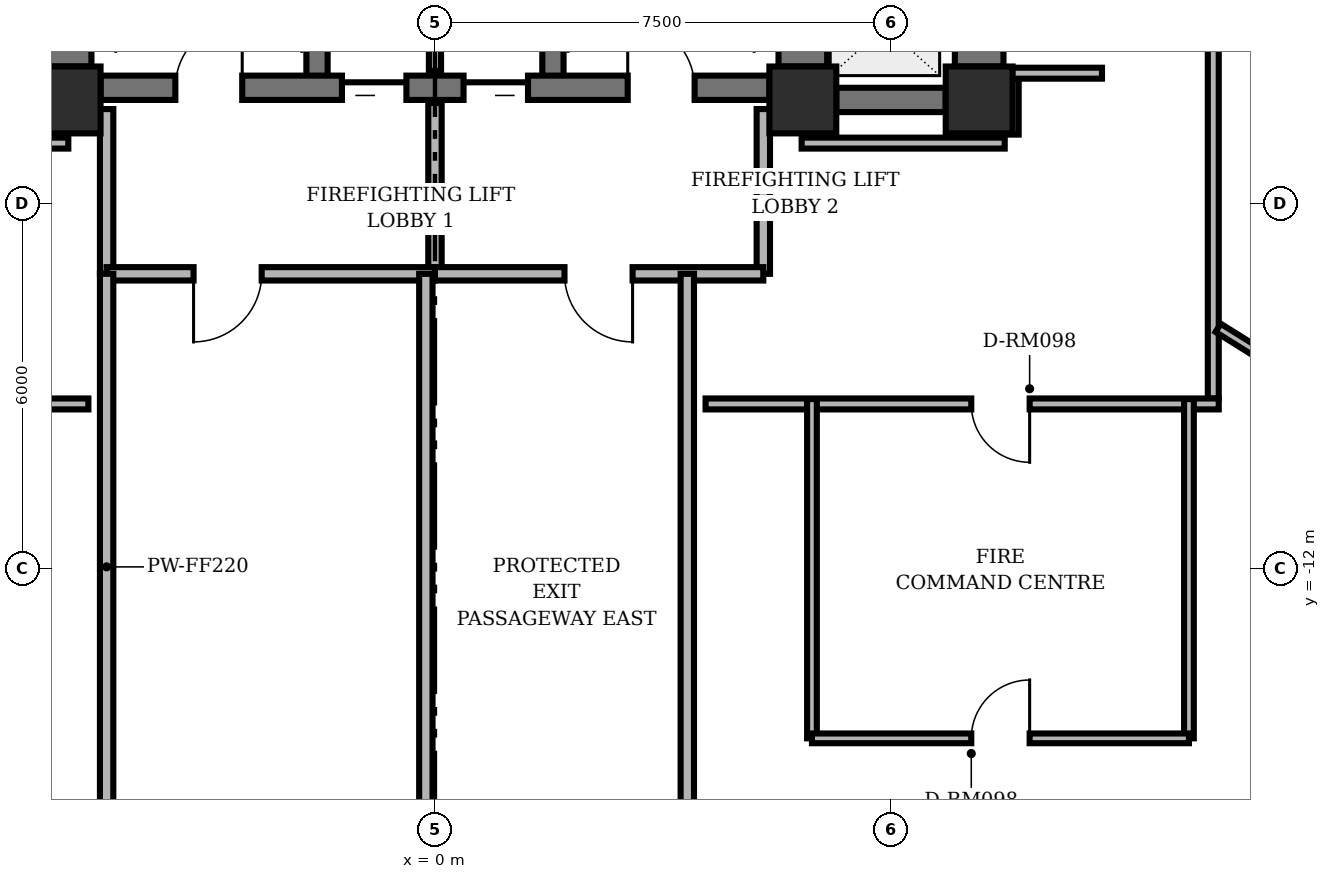
"""IFC4 building model, lengths in metres.
Left out: names, types, materials, properties, quantities, classifications, styles, units other than length and angle.
Written with IfcOpenShell. Run it as: python <this file> out.ifc"""

import sys

from ifc_helpers import new_model, si_unit, direction, frame, frame_2d, origin, origin_2d, place, context, subcontext, project, spatial, rectangle, hollow_rectangle, extrude, element, fill, save


model = new_model("IFC4")
c1 = context("Model", 3, precision=1e-05, world=origin(), true_north=direction((0.0, 1.0)))
c2 = subcontext(c1, "Body", "Model", "MODEL_VIEW")
j1 = project(units=[si_unit("LENGTHUNIT", "METRE"), si_unit("PLANEANGLEUNIT", "RADIAN")], contexts=[c1])
p1 = place(None, origin())
s1 = spatial("IfcSite", under=j1, at=p1, CompositionType="ELEMENT")
p2 = place(p1, origin())
s2 = spatial("IfcBuilding", under=s1, at=p2, CompositionType="ELEMENT")
p3 = place(p2, origin())
s3 = spatial("IfcBuildingStorey", under=s2, at=p3, CompositionType="ELEMENT", Elevation=0.0)
for number, where, z_axis, x_axis in (
    (1, (-6.05, -4.3, 0.0), (0.0, 0.0, 1.0), (1.0, 0.0, 0.0)),
    (2, (6.05, -4.3, 0.0), (0.0, 0.0, 1.0), (1.0, 0.0, 0.0)),
    (3, (8.95, -4.3, 0.0), (0.0, 0.0, 1.0), (1.0, 0.0, 0.0)),
):
    element("IfcColumn", number, at=place(p3, frame(where, z_axis=z_axis, x_axis=x_axis)), inside=s3, PredefinedType="COLUMN", context=c2, shape_type="SweptSolid", body=[
        extrude(hollow_rectangle(XDim=1.1, YDim=1.1, WallThickness=0.07, InnerFilletRadius=0.02, OuterFilletRadius=0.04, at=origin_2d()), origin(), (0.0, 0.0, 1.0), 4.8),
    ])
for number, where, z_axis, x_axis in (
    (4, (-6.05, -3.75, 0.0), (0.0, 0.0, 1.0), (0.0, 1.0, 0.0)),
    (5, (6.05, -3.75, 0.0), (0.0, 0.0, 1.0), (0.0, 1.0, 0.0)),
):
    element("IfcWall", number, at=place(p3, frame(where, z_axis=z_axis, x_axis=x_axis)), inside=s3, PredefinedType="SHEAR", context=c2, shape_type="SweptSolid", body=[
        extrude(rectangle(XDim=3.2, YDim=0.8, at=frame_2d((1.6, 0.0))), origin(), (0.0, 0.0, 1.0), 4.498),
    ])
for number, where, z_axis, x_axis in (
    (6, (-1.94, -4.1, 0.0), (0.0, 0.0, 1.0), (0.0, 1.0, 0.0)),
    (7, (1.94, -4.1, 0.0), (0.0, 0.0, 1.0), (0.0, 1.0, 0.0)),
):
    element("IfcWall", number, at=place(p3, frame(where, z_axis=z_axis, x_axis=x_axis)), inside=s3, PredefinedType="SHEAR", context=c2, shape_type="SweptSolid", body=[
        extrude(rectangle(XDim=8.2, YDim=0.35, at=frame_2d((4.1, 0.0))), origin(), (0.0, 0.0, 1.0), 4.498),
    ])
p4 = place(p3, frame((-5.5, -4.1, 0.0), z_axis=(0.0, 0.0, 1.0), x_axis=(1.0, 0.0, 0.0)))
e8 = element("IfcWall", 8, at=p4, inside=s3, PredefinedType="SHEAR", context=c2, shape_type="SweptSolid", body=[
    extrude(rectangle(XDim=11.0, YDim=0.4, at=frame_2d((5.5, 0.0))), origin(), (0.0, 0.0, 1.0), 4.498),
])
p5 = place(p4, frame((1.23, 0.0, 0.0)))
e9 = element("IfcOpeningElement", 9, at=p5, cuts=e8, PredefinedType="OPENING", context=c2, shape_type="SweptSolid", body=[
    extrude(rectangle(XDim=1.1, YDim=2.04, at=frame_2d((0.55, 1.02))), frame((0.0, 0.21, 0.0), z_axis=(0.0, -1.0, 0.0), x_axis=(1.0, 0.0, 0.0)), (0.0, 0.0, 1.0), 0.42),
])
p6 = place(p4, frame((8.67, 0.0, 0.0)))
e10 = element("IfcOpeningElement", 10, at=p6, cuts=e8, PredefinedType="OPENING", context=c2, shape_type="SweptSolid", body=[
    extrude(rectangle(XDim=1.1, YDim=2.04, at=frame_2d((0.55, 1.02))), frame((0.0, 0.21, 0.0), z_axis=(0.0, -1.0, 0.0), x_axis=(1.0, 0.0, 0.0)), (0.0, 0.0, 1.0), 0.42),
])
p7 = place(p4, frame((3.97, 0.0, 0.0)))
e11 = element("IfcOpeningElement", 11, at=p7, cuts=e8, PredefinedType="OPENING", context=c2, shape_type="SweptSolid", body=[
    extrude(rectangle(XDim=1.06, YDim=2.04, at=frame_2d((0.53, 1.02))), frame((0.0, 0.21, 0.0), z_axis=(0.0, -1.0, 0.0), x_axis=(1.0, 0.0, 0.0)), (0.0, 0.0, 1.0), 0.42),
])
p8 = place(p4, frame((5.97, 0.0, 0.0)))
e12 = element("IfcOpeningElement", 12, at=p8, cuts=e8, PredefinedType="OPENING", context=c2, shape_type="SweptSolid", body=[
    extrude(rectangle(XDim=1.06, YDim=2.04, at=frame_2d((0.53, 1.02))), frame((0.0, 0.21, 0.0), z_axis=(0.0, -1.0, 0.0), x_axis=(1.0, 0.0, 0.0)), (0.0, 0.0, 1.0), 0.42),
])
p9 = place(p3, frame((8.95, -3.75, 0.0), z_axis=(0.0, 0.0, 1.0), x_axis=(0.0, 1.0, 0.0)))
e13 = element("IfcWall", 13, at=p9, inside=s3, PredefinedType="SHEAR", context=c2, shape_type="SweptSolid", body=[
    extrude(rectangle(XDim=7.7, YDim=0.8, at=frame_2d((3.85, 0.0))), origin(), (0.0, 0.0, 1.0), 4.498),
])
p10 = place(p9, frame((0.55, 0.0, 0.0)))
e14 = element("IfcOpeningElement", 14, at=p10, cuts=e13, PredefinedType="OPENING", context=c2, shape_type="SweptSolid", body=[
    extrude(rectangle(XDim=1.06, YDim=2.04, at=frame_2d((0.53, 1.02))), frame((0.0, 0.41, 0.0), z_axis=(0.0, -1.0, 0.0), x_axis=(1.0, 0.0, 0.0)), (0.0, 0.0, 1.0), 0.82),
])
p11 = place(p9, frame((3.32, 0.0, 0.0)))
e15 = element("IfcOpeningElement", 15, at=p11, cuts=e13, PredefinedType="OPENING", context=c2, shape_type="SweptSolid", body=[
    extrude(rectangle(XDim=1.06, YDim=2.04, at=frame_2d((0.53, 1.02))), frame((0.0, 0.41, 0.0), z_axis=(0.0, -1.0, 0.0), x_axis=(1.0, 0.0, 0.0)), (0.0, 0.0, 1.0), 0.82),
])
p12 = place(p9, frame((6.08, 0.0, 0.0)))
e16 = element("IfcOpeningElement", 16, at=p12, cuts=e13, PredefinedType="OPENING", context=c2, shape_type="SweptSolid", body=[
    extrude(rectangle(XDim=1.06, YDim=2.04, at=frame_2d((0.53, 1.02))), frame((0.0, 0.41, 0.0), z_axis=(0.0, -1.0, 0.0), x_axis=(1.0, 0.0, 0.0)), (0.0, 0.0, 1.0), 0.82),
])
p13 = place(p3, frame((6.6, -4.3, 0.0), z_axis=(0.0, 0.0, 1.0), x_axis=(1.0, 0.0, 0.0)))
e17 = element("IfcWall", 17, at=p13, inside=s3, PredefinedType="SHEAR", context=c2, shape_type="SweptSolid", body=[
    extrude(rectangle(XDim=1.8, YDim=0.4, at=frame_2d((0.9, 0.0))), origin(), (0.0, 0.0, 1.0), 4.498),
])
p14 = place(p3, frame((0.0, -3.82, 0.0), z_axis=(0.0, 0.0, 1.0), x_axis=(0.0, 1.0, 0.0)))
e18 = element("IfcWall", 18, at=p14, inside=s3, PredefinedType="PARTITIONING", context=c2, shape_type="SweptSolid", body=[
    extrude(rectangle(XDim=2.67, YDim=0.2, at=frame_2d((1.335, 0.0))), origin(), (0.0, 0.0, 1.0), 4.473),
])
for number, where, z_axis, x_axis in (
    (19, (-5.4, -7.16, 0.0), (0.0, 0.0, 1.0), (0.0, 1.0, 0.0)),
    (20, (5.4, -7.16, 0.0), (0.0, 0.0, 1.0), (0.0, 1.0, 0.0)),
):
    element("IfcWall", number, at=place(p3, frame(where, z_axis=z_axis, x_axis=x_axis)), inside=s3, PredefinedType="PARTITIONING", context=c2, shape_type="SweptSolid", body=[
        extrude(rectangle(XDim=2.71, YDim=0.22, at=frame_2d((1.355, 0.0))), origin(), (0.0, 0.0, 1.0), 4.473),
    ])
p15 = place(p3, frame((0.0, -7.16, 0.0), z_axis=(0.0, 0.0, 1.0), x_axis=(0.0, 1.0, 0.0)))
e21 = element("IfcWall", 21, at=p15, inside=s3, PredefinedType="PARTITIONING", context=c2, shape_type="SweptSolid", body=[
    extrude(rectangle(XDim=2.81, YDim=0.22, at=frame_2d((1.405, 0.0))), origin(), (0.0, 0.0, 1.0), 4.473),
])
p16 = place(p3, frame((0.0, -7.16, 0.0), z_axis=(0.0, 0.0, 1.0), x_axis=(-1.0, 0.0, 0.0)))
e22 = element("IfcWall", 22, at=p16, inside=s3, PredefinedType="PARTITIONING", context=c2, shape_type="SweptSolid", body=[
    extrude(rectangle(XDim=5.4, YDim=0.22, at=frame_2d((2.7, 0.0))), origin(), (0.0, 0.0, 1.0), 4.473),
])
p17 = place(p16, frame((2.85, 0.0, 0.0)))
e23 = element("IfcOpeningElement", 23, at=p17, cuts=e22, PredefinedType="OPENING", context=c2, shape_type="SweptSolid", body=[
    extrude(rectangle(XDim=1.12, YDim=2.02, at=frame_2d((0.56, 1.01))), frame((0.0, 0.12, 0.0), z_axis=(0.0, -1.0, 0.0), x_axis=(1.0, 0.0, 0.0)), (0.0, 0.0, 1.0), 0.24),
])
p18 = place(p3, frame((5.4, -7.16, 0.0), z_axis=(0.0, 0.0, 1.0), x_axis=(-1.0, 0.0, 0.0)))
e24 = element("IfcWall", 24, at=p18, inside=s3, PredefinedType="PARTITIONING", context=c2, shape_type="SweptSolid", body=[
    extrude(rectangle(XDim=5.4, YDim=0.22, at=frame_2d((2.7, 0.0))), origin(), (0.0, 0.0, 1.0), 4.473),
])
p19 = place(p18, frame((2.15, 0.0, 0.0)))
e25 = element("IfcOpeningElement", 25, at=p19, cuts=e24, PredefinedType="OPENING", context=c2, shape_type="SweptSolid", body=[
    extrude(rectangle(XDim=1.12, YDim=2.02, at=frame_2d((0.56, 1.01))), frame((0.0, 0.12, 0.0), z_axis=(0.0, -1.0, 0.0), x_axis=(1.0, 0.0, 0.0)), (0.0, 0.0, 1.0), 0.24),
])
p20 = place(p3, frame((-5.4, -16.8, 0.0), z_axis=(0.0, 0.0, 1.0), x_axis=(0.0, 1.0, 0.0)))
e26 = element("IfcWall", 26, at=p20, inside=s3, PredefinedType="PARTITIONING", context=c2, shape_type="SweptSolid", body=[
    extrude(rectangle(XDim=9.64, YDim=0.22, at=frame_2d((4.82, 0.0))), origin(), (0.0, 0.0, 1.0), 4.473),
])
for number, where, z_axis, x_axis in (
    (27, (-0.15, -24.5, 0.0), (0.0, 0.0, 1.0), (0.0, 1.0, 0.0)),
    (28, (4.15, -24.5, 0.0), (0.0, 0.0, 1.0), (0.0, 1.0, 0.0)),
):
    element("IfcWall", number, at=place(p3, frame(where, z_axis=z_axis, x_axis=x_axis)), inside=s3, PredefinedType="PARTITIONING", context=c2, shape_type="SweptSolid", body=[
        extrude(rectangle(XDim=17.34, YDim=0.22, at=frame_2d((8.67, 0.0))), origin(), (0.0, 0.0, 1.0), 4.473),
    ])
p21 = place(p3, frame((12.8, -1.59, 0.0), z_axis=(0.0, 0.0, 1.0), x_axis=(0.0, -1.0, 0.0)))
e29 = element("IfcWall", 29, at=p21, inside=s3, PredefinedType="PARTITIONING", context=c2, shape_type="SweptSolid", body=[
    extrude(rectangle(XDim=7.62, YDim=0.18, at=frame_2d((3.81, 0.0))), origin(), (0.0, 0.0, 1.0), 4.473),
])
p22 = place(p3, frame((12.89, -9.3, 0.0), z_axis=(0.0, 0.0, 1.0), x_axis=(-1.0, 0.0, 0.0)))
e30 = element("IfcWall", 30, at=p22, inside=s3, PredefinedType="PARTITIONING", context=c2, shape_type="SweptSolid", body=[
    extrude(rectangle(XDim=8.44, YDim=0.18, at=frame_2d((4.22, 0.0))), origin(), (0.0, 0.0, 1.0), 3.987),
])
p23 = place(p22, frame((3.11, 0.0, 0.0)))
e31 = element("IfcOpeningElement", 31, at=p23, cuts=e30, PredefinedType="OPENING", context=c2, shape_type="SweptSolid", body=[
    extrude(rectangle(XDim=0.96, YDim=2.02, at=frame_2d((0.48, 1.01))), frame((0.0, 0.1, 0.0), z_axis=(0.0, -1.0, 0.0), x_axis=(1.0, 0.0, 0.0)), (0.0, 0.0, 1.0), 0.2),
])
p24 = place(p3, frame((6.03, -5.01, 0.0), z_axis=(0.0, 0.0, 1.0), x_axis=(1.0, 0.0, 0.0)))
e32 = element("IfcWall", 32, at=p24, inside=s3, PredefinedType="PARTITIONING", context=c2, shape_type="SweptSolid", body=[
    extrude(rectangle(XDim=3.34, YDim=0.18, at=frame_2d((1.67, 0.0))), origin(), (0.0, 0.0, 1.0), 4.473),
])
p25 = place(p3, frame((9.51, -4.87, 0.0), z_axis=(0.0, 0.0, 1.0), x_axis=(0.0, 1.0, 0.0)))
e33 = element("IfcWall", 33, at=p25, inside=s3, PredefinedType="PARTITIONING", context=c2, shape_type="SweptSolid", body=[
    extrude(rectangle(XDim=0.92, YDim=0.18, at=frame_2d((0.46, 0.0))), origin(), (0.0, 0.0, 1.0), 4.473),
])
p26 = place(p3, frame((9.42, -3.86, 0.0), z_axis=(0.0, 0.0, 1.0), x_axis=(1.0, 0.0, 0.0)))
e34 = element("IfcWall", 34, at=p26, inside=s3, PredefinedType="PARTITIONING", context=c2, shape_type="SweptSolid", body=[
    extrude(rectangle(XDim=1.55, YDim=0.18, at=frame_2d((0.775, 0.0))), origin(), (0.0, 0.0, 1.0), 4.473),
])
p27 = place(p3, frame((-9.37, -5.01, 0.0), z_axis=(0.0, 0.0, 1.0), x_axis=(1.0, 0.0, 0.0)))
e35 = element("IfcWall", 35, at=p27, inside=s3, PredefinedType="PARTITIONING", context=c2, shape_type="SweptSolid", body=[
    extrude(rectangle(XDim=3.34, YDim=0.18, at=frame_2d((1.67, 0.0))), origin(), (0.0, 0.0, 1.0), 4.473),
])
p28 = place(p3, frame((-5.7, -9.3, 0.0), z_axis=(0.0, 0.0, 1.0), x_axis=(-1.0, 0.0, 0.0)))
e36 = element("IfcWall", 36, at=p28, inside=s3, PredefinedType="PARTITIONING", context=c2, shape_type="SweptSolid", body=[
    extrude(rectangle(XDim=7.19, YDim=0.18, at=frame_2d((3.595, 0.0))), origin(), (0.0, 0.0, 1.0), 3.987),
])
p29 = place(p28, frame((3.085, 0.0, 0.0)))
e37 = element("IfcOpeningElement", 37, at=p29, cuts=e36, PredefinedType="OPENING", context=c2, shape_type="SweptSolid", body=[
    extrude(rectangle(XDim=1.02, YDim=2.02, at=frame_2d((0.51, 1.01))), frame((0.0, 0.1, 0.0), z_axis=(0.0, -1.0, 0.0), x_axis=(1.0, 0.0, 0.0)), (0.0, 0.0, 1.0), 0.2),
])
p30 = place(p3, frame((12.88, -8.048, 0.0), z_axis=(0.0, 0.0, 1.0), x_axis=(0.848053688019, -0.529910315278, 0.0)))
e38 = element("IfcWall", 38, at=p30, inside=s3, PredefinedType="PARTITIONING", context=c2, shape_type="SweptSolid", body=[
    extrude(rectangle(XDim=11.886, YDim=0.16, at=frame_2d((5.943, 0.0))), origin(), (0.0, 0.0, 1.0), 4.473),
])
p31 = place(p3, frame((12.4, -14.8, 0.0), z_axis=(0.0, 0.0, 1.0), x_axis=(0.0, 1.0, 0.0)))
e39 = element("IfcWall", 39, at=p31, inside=s3, PredefinedType="PARTITIONING", context=c2, shape_type="SweptSolid", body=[
    extrude(rectangle(XDim=5.58, YDim=0.16, at=frame_2d((2.79, 0.0))), origin(), (0.0, 0.0, 1.0), 4.473),
])
p32 = place(p3, frame((6.2, -9.22, 0.0), z_axis=(0.0, 0.0, 1.0), x_axis=(0.0, -1.0, 0.0)))
e40 = element("IfcWall", 40, at=p32, inside=s3, PredefinedType="PARTITIONING", context=c2, shape_type="SweptSolid", body=[
    extrude(rectangle(XDim=5.58, YDim=0.16, at=frame_2d((2.79, 0.0))), origin(), (0.0, 0.0, 1.0), 3.598),
])
p33 = place(p3, frame((6.2, -14.8, 0.0), z_axis=(0.0, 0.0, 1.0), x_axis=(1.0, 0.0, 0.0)))
e41 = element("IfcWall", 41, at=p33, inside=s3, PredefinedType="PARTITIONING", context=c2, shape_type="SweptSolid", body=[
    extrude(rectangle(XDim=6.2, YDim=0.16, at=frame_2d((3.1, 0.0))), origin(), (0.0, 0.0, 1.0), 4.473),
])
p34 = place(p33, frame((2.62, 0.0, 0.0)))
e42 = element("IfcOpeningElement", 42, at=p34, cuts=e41, PredefinedType="OPENING", context=c2, shape_type="SweptSolid", body=[
    extrude(rectangle(XDim=0.96, YDim=2.02, at=frame_2d((0.48, 1.01))), frame((0.0, 0.09, 0.0), z_axis=(0.0, -1.0, 0.0), x_axis=(1.0, 0.0, 0.0)), (0.0, 0.0, 1.0), 0.18),
])
p35 = place(p5, origin())
e43 = element("IfcDoor", 43, at=p35, inside=s3, OperationType="SINGLE_SWING_RIGHT", PredefinedType="DOOR", context=c2, shape_type="SweptSolid", body=[
    extrude(rectangle(XDim=1.1, YDim=2.04, at=frame_2d((0.55, 1.02))), frame((0.0, 0.025, 0.0), z_axis=(0.0, -1.0, 0.0), x_axis=(1.0, 0.0, 0.0)), (0.0, 0.0, 1.0), 0.05),
])
fill(e9, e43)
p36 = place(p6, origin())
e44 = element("IfcDoor", 44, at=p36, inside=s3, OperationType="SINGLE_SWING_LEFT", PredefinedType="DOOR", context=c2, shape_type="SweptSolid", body=[
    extrude(rectangle(XDim=1.1, YDim=2.04, at=frame_2d((0.55, 1.02))), frame((0.0, 0.025, 0.0), z_axis=(0.0, -1.0, 0.0), x_axis=(1.0, 0.0, 0.0)), (0.0, 0.0, 1.0), 0.05),
])
fill(e10, e44)
p37 = place(p7, origin())
e45 = element("IfcDoor", 45, at=p37, inside=s3, OperationType="SLIDING_TO_LEFT", PredefinedType="DOOR", context=c2, shape_type="SweptSolid", body=[
    extrude(rectangle(XDim=1.06, YDim=2.04, at=frame_2d((0.53, 1.02))), frame((0.0, 0.025, 0.0), z_axis=(0.0, -1.0, 0.0), x_axis=(1.0, 0.0, 0.0)), (0.0, 0.0, 1.0), 0.05),
])
fill(e11, e45)
p38 = place(p8, origin())
e46 = element("IfcDoor", 46, at=p38, inside=s3, OperationType="SLIDING_TO_RIGHT", PredefinedType="DOOR", context=c2, shape_type="SweptSolid", body=[
    extrude(rectangle(XDim=1.06, YDim=2.04, at=frame_2d((0.53, 1.02))), frame((0.0, 0.025, 0.0), z_axis=(0.0, -1.0, 0.0), x_axis=(1.0, 0.0, 0.0)), (0.0, 0.0, 1.0), 0.05),
])
fill(e12, e46)
p39 = place(p17, origin())
e47 = element("IfcDoor", 47, at=p39, inside=s3, OperationType="SINGLE_SWING_RIGHT", PredefinedType="DOOR", context=c2, shape_type="SweptSolid", body=[
    extrude(rectangle(XDim=1.12, YDim=2.02, at=frame_2d((0.56, 1.01))), frame((0.0, 0.025, 0.0), z_axis=(0.0, -1.0, 0.0), x_axis=(1.0, 0.0, 0.0)), (0.0, 0.0, 1.0), 0.05),
])
fill(e23, e47)
p40 = place(p19, origin())
e48 = element("IfcDoor", 48, at=p40, inside=s3, OperationType="SINGLE_SWING_LEFT", PredefinedType="DOOR", context=c2, shape_type="SweptSolid", body=[
    extrude(rectangle(XDim=1.12, YDim=2.02, at=frame_2d((0.56, 1.01))), frame((0.0, 0.025, 0.0), z_axis=(0.0, -1.0, 0.0), x_axis=(1.0, 0.0, 0.0)), (0.0, 0.0, 1.0), 0.05),
])
fill(e25, e48)
p41 = place(p23, origin())
e49 = element("IfcDoor", 49, at=p41, inside=s3, OperationType="SINGLE_SWING_LEFT", PredefinedType="DOOR", context=c2, shape_type="SweptSolid", body=[
    extrude(rectangle(XDim=0.96, YDim=2.02, at=frame_2d((0.48, 1.01))), frame((0.0, 0.025, 0.0), z_axis=(0.0, -1.0, 0.0), x_axis=(1.0, 0.0, 0.0)), (0.0, 0.0, 1.0), 0.05),
])
fill(e31, e49)
p42 = place(p34, origin())
e50 = element("IfcDoor", 50, at=p42, inside=s3, OperationType="SINGLE_SWING_RIGHT", PredefinedType="DOOR", context=c2, shape_type="SweptSolid", body=[
    extrude(rectangle(XDim=0.96, YDim=2.02, at=frame_2d((0.48, 1.01))), frame((0.0, 0.025, 0.0), z_axis=(0.0, -1.0, 0.0), x_axis=(1.0, 0.0, 0.0)), (0.0, 0.0, 1.0), 0.05),
])
fill(e42, e50)
save(model, sys.argv[1])
